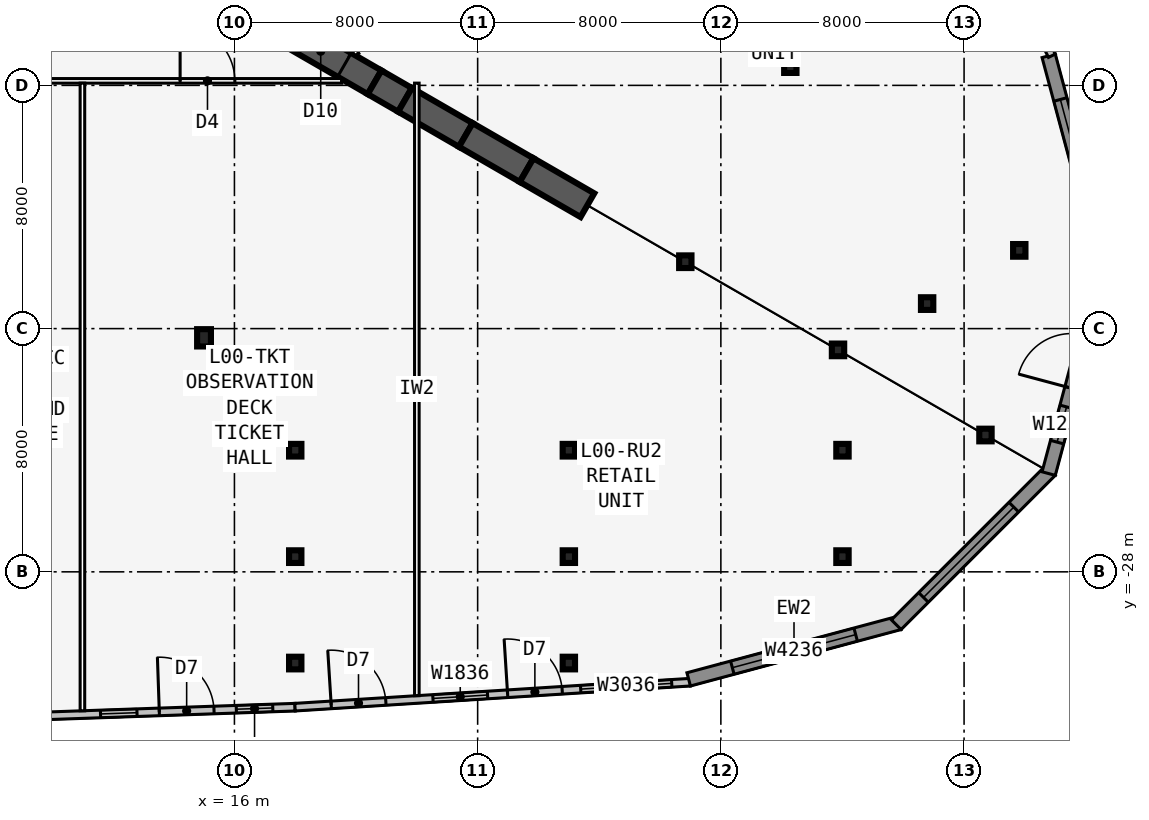
"""IFC4 building model, lengths in metres.
Left out: names, types, materials, properties, quantities, classifications, styles, units other than length and angle.
Written with IfcOpenShell. Run it as: python <this file> out.ifc"""

import sys

from ifc_helpers import new_model, si_unit, direction, frame, frame_2d, origin, origin_2d, place, context, subcontext, project, spatial, rectangle, i_section, extrude, element, fill, save


model = new_model("IFC4")
c1 = context("Model", 3, precision=1e-05, world=origin(), true_north=direction((0.0, 1.0)))
c2 = subcontext(c1, "Body", "Model", "MODEL_VIEW")
j1 = project(units=[si_unit("LENGTHUNIT", "METRE"), si_unit("PLANEANGLEUNIT", "RADIAN")], contexts=[c1])
p1 = place(None, origin())
s1 = spatial("IfcSite", under=j1, at=p1, CompositionType="ELEMENT")
p2 = place(p1, origin())
s2 = spatial("IfcBuilding", under=s1, at=p2, CompositionType="ELEMENT")
p3 = place(p2, origin())
s3 = spatial("IfcBuildingStorey", under=s2, at=p3, CompositionType="ELEMENT", Elevation=0.0)
p4 = place(p3, frame((16.5, -9.526, -0.3), z_axis=(0.0, 0.0, 1.0), x_axis=(0.866031398331, -0.499989616998, 0.0)))
e1 = element("IfcWall", 1, at=p4, inside=s3, PredefinedType="SHEAR", context=c2, shape_type="SweptSolid", body=[
    extrude(rectangle(XDim=4.746, YDim=0.9, at=frame_2d((2.373, 0.0))), origin(), (0.0, 0.0, 1.0), 6.3),
])
p5 = place(p4, frame((1.8, 0.0, 0.3)))
e2 = element("IfcOpeningElement", 2, at=p5, cuts=e1, PredefinedType="OPENING", context=c2, shape_type="SweptSolid", body=[
    extrude(rectangle(XDim=1.8, YDim=2.13, at=frame_2d((0.9, 1.065))), frame((0.0, 0.46, 0.0), z_axis=(0.0, -1.0, 0.0), x_axis=(1.0, 0.0, 0.0)), (0.0, 0.0, 1.0), 0.92),
])
p6 = place(p3, frame((20.61, -11.899, -0.3), z_axis=(0.0, 0.0, 1.0), x_axis=(0.866009537788, -0.500027479704, 0.0)))
e3 = element("IfcWall", 3, at=p6, inside=s3, PredefinedType="SHEAR", context=c2, shape_type="SweptSolid", body=[
    extrude(rectangle(XDim=1.155, YDim=0.9, at=frame_2d((0.577, 0.0))), origin(), (0.0, 0.0, 1.0), 6.3),
])
for number, where, z_axis, x_axis in (
    (4, (21.61, -12.477, -0.3), (0.0, 0.0, 1.0), (0.866, -0.5, 0.0)),
    (5, (23.61, -13.631, -0.3), (0.0, 0.0, 1.0), (0.866, -0.5, 0.0)),
    (6, (25.61, -14.786, -0.3), (0.0, 0.0, 1.0), (0.866, -0.5, 0.0)),
):
    element("IfcWall", number, at=place(p3, frame(where, z_axis=z_axis, x_axis=x_axis)), inside=s3, PredefinedType="SHEAR", context=c2, shape_type="SweptSolid", body=[
        extrude(rectangle(XDim=2.309, YDim=0.9, at=frame_2d((1.155, 0.0))), origin(), (0.0, 0.0, 1.0), 6.3),
    ])
p7 = place(p3, frame((15.0, -20.303, -0.3), z_axis=(0.0, 0.0, 1.0), x_axis=(1.0, 0.0, 0.0)))
e7 = element("IfcColumn", 7, at=p7, inside=s3, PredefinedType="COLUMN", context=c2, shape_type="SweptSolid", body=[
    extrude(i_section(OverallWidth=0.455, OverallDepth=0.569, WebThickness=0.078, FlangeThickness=0.125, at=origin_2d()), origin(), (0.0, 0.0, 1.0), 6.3),
])
for number, where, z_axis, x_axis in (
    (8, (30.831, -17.8, -0.3), (0.0, 0.0, 1.0), (1.0, 0.0, 0.0)),
    (9, (35.854, -20.7, -0.3), (0.0, 0.0, 1.0), (1.0, 0.0, 0.0)),
    (10, (40.703, -23.5, -0.3), (0.0, 0.0, 1.0), (1.0, 0.0, 0.0)),
    (11, (18.0, -24.0, -0.3), (0.0, 0.0, 1.0), (1.0, 0.0, 0.0)),
    (12, (27.0, -24.0, -0.3), (0.0, 0.0, 1.0), (1.0, 0.0, 0.0)),
    (13, (36.0, -24.0, -0.3), (0.0, 0.0, 1.0), (1.0, 0.0, 0.0)),
    (14, (34.285, -11.383, -0.3), (0.0, 0.0, 1.0), (1.0, 0.0, 0.0)),
    (15, (38.785, -19.177, -0.3), (0.0, 0.0, 1.0), (1.0, 0.0, 0.0)),
    (16, (18.0, -27.5, -0.3), (0.0, 0.0, 1.0), (1.0, 0.0, 0.0)),
    (17, (27.0, -27.5, -0.3), (0.0, 0.0, 1.0), (1.0, 0.0, 0.0)),
    (18, (36.0, -27.5, -0.3), (0.0, 0.0, 1.0), (1.0, 0.0, 0.0)),
    (19, (41.816, -17.427, -0.3), (0.0, 0.0, 1.0), (1.0, 0.0, 0.0)),
    (20, (18.0, -31.0, -0.3), (0.0, 0.0, 1.0), (1.0, 0.0, 0.0)),
    (21, (27.0, -31.0, -0.3), (0.0, 0.0, 1.0), (1.0, 0.0, 0.0)),
):
    element("IfcColumn", number, at=place(p3, frame(where, z_axis=z_axis, x_axis=x_axis)), inside=s3, PredefinedType="COLUMN", context=c2, shape_type="SweptSolid", body=[
        extrude(i_section(OverallWidth=0.406, OverallDepth=0.417, WebThickness=0.03, FlangeThickness=0.048, at=origin_2d()), origin(), (0.0, 0.0, 1.0), 6.3),
    ])
p8 = place(p3, frame((8.996, -32.765, -0.3), z_axis=(0.0, 0.0, 1.0), x_axis=(0.999393961522, 0.034809620405, 0.0)))
e22 = element("IfcWall", 22, at=p8, inside=s3, PredefinedType="STANDARD", context=c2, shape_type="SweptSolid", body=[
    extrude(rectangle(XDim=9.005, YDim=0.25, at=frame_2d((4.503, 0.0))), origin(), (0.0, 0.0, 1.0), 6.05),
])
p9 = place(p8, frame((4.536, 0.0, 0.3)))
e23 = element("IfcOpeningElement", 23, at=p9, cuts=e22, PredefinedType="OPENING", context=c2, shape_type="SweptSolid", body=[
    extrude(rectangle(XDim=1.8, YDim=2.7, at=frame_2d((0.9, 1.35))), frame((0.0, 0.135, 0.0), z_axis=(0.0, -1.0, 0.0), x_axis=(1.0, 0.0, 0.0)), (0.0, 0.0, 1.0), 0.27),
])
p10 = place(p8, frame((2.602, 0.0, 1.2)))
e24 = element("IfcOpeningElement", 24, at=p10, cuts=e22, PredefinedType="OPENING", context=c2, shape_type="SweptSolid", body=[
    extrude(rectangle(XDim=1.2, YDim=3.6, at=frame_2d((0.6, 1.8))), frame((0.0, 0.135, 0.0), z_axis=(0.0, -1.0, 0.0), x_axis=(1.0, 0.0, 0.0)), (0.0, 0.0, 1.0), 0.27),
])
p11 = place(p8, frame((7.071, 0.0, 1.2)))
e25 = element("IfcOpeningElement", 25, at=p11, cuts=e22, PredefinedType="OPENING", context=c2, shape_type="SweptSolid", body=[
    extrude(rectangle(XDim=1.2, YDim=3.6, at=frame_2d((0.6, 1.8))), frame((0.0, 0.135, 0.0), z_axis=(0.0, -1.0, 0.0), x_axis=(1.0, 0.0, 0.0)), (0.0, 0.0, 1.0), 0.27),
])
p12 = place(p3, frame((17.992, -32.451, -0.3), z_axis=(0.0, 0.0, 1.0), x_axis=(0.998006805525, 0.063106387361, 0.0)))
e26 = element("IfcWall", 26, at=p12, inside=s3, PredefinedType="STANDARD", context=c2, shape_type="SweptSolid", body=[
    extrude(rectangle(XDim=13.026, YDim=0.25, at=frame_2d((6.513, 0.0))), origin(), (0.0, 0.0, 1.0), 6.05),
])
p13 = place(p12, frame((1.193, 0.0, 0.3)))
e27 = element("IfcOpeningElement", 27, at=p13, cuts=e26, PredefinedType="OPENING", context=c2, shape_type="SweptSolid", body=[
    extrude(rectangle(XDim=1.8, YDim=2.7, at=frame_2d((0.9, 1.35))), frame((0.0, 0.135, 0.0), z_axis=(0.0, -1.0, 0.0), x_axis=(1.0, 0.0, 0.0)), (0.0, 0.0, 1.0), 0.27),
])
p14 = place(p12, frame((7.006, 0.0, 0.3)))
e28 = element("IfcOpeningElement", 28, at=p14, cuts=e26, PredefinedType="OPENING", context=c2, shape_type="SweptSolid", body=[
    extrude(rectangle(XDim=1.8, YDim=2.7, at=frame_2d((0.9, 1.35))), frame((0.0, 0.135, 0.0), z_axis=(0.0, -1.0, 0.0), x_axis=(1.0, 0.0, 0.0)), (0.0, 0.0, 1.0), 0.27),
])
p15 = place(p12, frame((4.546, 0.0, 1.2)))
e29 = element("IfcOpeningElement", 29, at=p15, cuts=e26, PredefinedType="OPENING", context=c2, shape_type="SweptSolid", body=[
    extrude(rectangle(XDim=1.8, YDim=3.6, at=frame_2d((0.9, 1.8))), frame((0.0, 0.135, 0.0), z_axis=(0.0, -1.0, 0.0), x_axis=(1.0, 0.0, 0.0)), (0.0, 0.0, 1.0), 0.27),
])
p16 = place(p12, frame((9.416, 0.0, 1.2)))
e30 = element("IfcOpeningElement", 30, at=p16, cuts=e26, PredefinedType="OPENING", context=c2, shape_type="SweptSolid", body=[
    extrude(rectangle(XDim=3.0, YDim=3.6, at=frame_2d((1.5, 1.8))), frame((0.0, 0.135, 0.0), z_axis=(0.0, -1.0, 0.0), x_axis=(1.0, 0.0, 0.0)), (0.0, 0.0, 1.0), 0.27),
])
p17 = place(p3, frame((30.942, -31.537, -0.3), z_axis=(0.0, 0.0, 1.0), x_axis=(0.965924653531, 0.258823421857, 0.0)))
e31 = element("IfcWall", 31, at=p17, inside=s3, PredefinedType="SOLIDWALL", context=c2, shape_type="SweptSolid", body=[
    extrude(rectangle(XDim=7.173, YDim=0.45, at=frame_2d((3.586, 0.0))), origin(), (0.0, 0.0, 1.0), 6.05),
])
p18 = place(p17, frame((1.486, 0.0, 1.2)))
e32 = element("IfcOpeningElement", 32, at=p18, cuts=e31, PredefinedType="OPENING", context=c2, shape_type="SweptSolid", body=[
    extrude(rectangle(XDim=4.2, YDim=3.6, at=frame_2d((2.1, 1.8))), frame((0.0, 0.235, 0.0), z_axis=(0.0, -1.0, 0.0), x_axis=(1.0, 0.0, 0.0)), (0.0, 0.0, 1.0), 0.47),
])
p19 = place(p3, frame((37.769, -29.739, -0.3), z_axis=(0.0, 0.0, 1.0), x_axis=(0.707106781187, 0.707106781187, 0.0)))
e33 = element("IfcWall", 33, at=p19, inside=s3, PredefinedType="SOLIDWALL", context=c2, shape_type="SweptSolid", body=[
    extrude(rectangle(XDim=7.173, YDim=0.45, at=frame_2d((3.586, 0.0))), origin(), (0.0, 0.0, 1.0), 6.05),
])
p20 = place(p19, frame((1.268, 0.0, 1.2)))
e34 = element("IfcOpeningElement", 34, at=p20, cuts=e33, PredefinedType="OPENING", context=c2, shape_type="SweptSolid", body=[
    extrude(rectangle(XDim=4.2, YDim=3.6, at=frame_2d((2.1, 1.8))), frame((0.0, 0.235, 0.0), z_axis=(0.0, -1.0, 0.0), x_axis=(1.0, 0.0, 0.0)), (0.0, 0.0, 1.0), 0.47),
])
p21 = place(p3, frame((42.783, -24.768, -0.3), z_axis=(0.0, 0.0, 1.0), x_axis=(0.258823421857, 0.965924653531, 0.0)))
e35 = element("IfcWall", 35, at=p21, inside=s3, PredefinedType="SOLIDWALL", context=c2, shape_type="SweptSolid", body=[
    extrude(rectangle(XDim=7.173, YDim=0.45, at=frame_2d((3.586, 0.0))), origin(), (0.0, 0.0, 1.0), 6.05),
])
p22 = place(p21, frame((2.905, 0.0, 0.3)))
e36 = element("IfcOpeningElement", 36, at=p22, cuts=e35, PredefinedType="OPENING", context=c2, shape_type="SweptSolid", body=[
    extrude(rectangle(XDim=1.8, YDim=2.7, at=frame_2d((0.9, 1.35))), frame((0.0, 0.235, 0.0), z_axis=(0.0, -1.0, 0.0), x_axis=(1.0, 0.0, 0.0)), (0.0, 0.0, 1.0), 0.47),
])
p23 = place(p21, frame((1.071, 0.0, 1.2)))
e37 = element("IfcOpeningElement", 37, at=p23, cuts=e35, PredefinedType="OPENING", context=c2, shape_type="SweptSolid", body=[
    extrude(rectangle(XDim=1.2, YDim=3.6, at=frame_2d((0.6, 1.8))), frame((0.0, 0.235, 0.0), z_axis=(0.0, -1.0, 0.0), x_axis=(1.0, 0.0, 0.0)), (0.0, 0.0, 1.0), 0.47),
])
p24 = place(p21, frame((5.339, 0.0, 1.2)))
e38 = element("IfcOpeningElement", 38, at=p24, cuts=e35, PredefinedType="OPENING", context=c2, shape_type="SweptSolid", body=[
    extrude(rectangle(XDim=1.2, YDim=3.6, at=frame_2d((0.6, 1.8))), frame((0.0, 0.235, 0.0), z_axis=(0.0, -1.0, 0.0), x_axis=(1.0, 0.0, 0.0)), (0.0, 0.0, 1.0), 0.47),
])
p25 = place(p3, frame((44.639, -17.956, -0.3), z_axis=(0.0, 0.0, 1.0), x_axis=(-0.258823421857, 0.965924653531, 0.0)))
e39 = element("IfcWall", 39, at=p25, inside=s3, PredefinedType="SOLIDWALL", context=c2, shape_type="SweptSolid", body=[
    extrude(rectangle(XDim=7.173, YDim=0.45, at=frame_2d((3.586, 0.0))), origin(), (0.0, 0.0, 1.0), 6.05),
])
p26 = place(p25, frame((1.486, 0.0, 1.2)))
e40 = element("IfcOpeningElement", 40, at=p26, cuts=e39, PredefinedType="OPENING", context=c2, shape_type="SweptSolid", body=[
    extrude(rectangle(XDim=4.2, YDim=3.6, at=frame_2d((2.1, 1.8))), frame((0.0, 0.235, 0.0), z_axis=(0.0, -1.0, 0.0), x_axis=(1.0, 0.0, 0.0)), (0.0, 0.0, 1.0), 0.47),
])
p27 = place(p3, frame((42.888, -11.025, -0.3), z_axis=(0.0, 0.0, 1.0), x_axis=(-0.444354908353, 0.895850833243, 0.0)))
e41 = element("IfcWall", 41, at=p27, inside=s3, PredefinedType="STANDARD", context=c2, shape_type="SweptSolid", body=[
    extrude(rectangle(XDim=13.026, YDim=0.25, at=frame_2d((6.513, 0.0))), origin(), (0.0, 0.0, 1.0), 6.05),
])
p28 = place(p27, frame((4.413, 0.0, 1.2)))
e42 = element("IfcOpeningElement", 42, at=p28, cuts=e41, PredefinedType="OPENING", context=c2, shape_type="SweptSolid", body=[
    extrude(rectangle(XDim=4.2, YDim=3.6, at=frame_2d((2.1, 1.8))), frame((0.0, 0.135, 0.0), z_axis=(0.0, -1.0, 0.0), x_axis=(1.0, 0.0, 0.0)), (0.0, 0.0, 1.0), 0.27),
])
p29 = place(p3, frame((-19.527, -11.851, -0.3), z_axis=(0.0, 0.0, 1.0), x_axis=(1.0, 0.0, 0.0)))
e43 = element("IfcWall", 43, at=p29, inside=s3, PredefinedType="PARTITIONING", context=c2, shape_type="SweptSolid", body=[
    extrude(rectangle(XDim=39.054, YDim=0.15, at=frame_2d((19.527, 0.0))), origin(), (0.0, 0.0, 1.0), 5.108),
])
p30 = place(p29, frame((8.427, 0.0, 0.3)))
e44 = element("IfcOpeningElement", 44, at=p30, cuts=e43, PredefinedType="OPENING", context=c2, shape_type="SweptSolid", body=[
    extrude(rectangle(XDim=1.8, YDim=2.13, at=frame_2d((0.9, 1.065))), frame((0.0, 0.085, 0.0), z_axis=(0.0, -1.0, 0.0), x_axis=(1.0, 0.0, 0.0)), (0.0, 0.0, 1.0), 0.17),
])
p31 = place(p29, frame((18.427, 0.0, 0.3)))
e45 = element("IfcOpeningElement", 45, at=p31, cuts=e43, PredefinedType="OPENING", context=c2, shape_type="SweptSolid", body=[
    extrude(rectangle(XDim=1.8, YDim=2.13, at=frame_2d((0.9, 1.065))), frame((0.0, 0.085, 0.0), z_axis=(0.0, -1.0, 0.0), x_axis=(1.0, 0.0, 0.0)), (0.0, 0.0, 1.0), 0.17),
])
p32 = place(p29, frame((23.227, 0.0, 0.3)))
e46 = element("IfcOpeningElement", 46, at=p32, cuts=e43, PredefinedType="OPENING", context=c2, shape_type="SweptSolid", body=[
    extrude(rectangle(XDim=1.8, YDim=2.13, at=frame_2d((0.9, 1.065))), frame((0.0, 0.085, 0.0), z_axis=(0.0, -1.0, 0.0), x_axis=(1.0, 0.0, 0.0)), (0.0, 0.0, 1.0), 0.17),
])
p33 = place(p29, frame((28.127, 0.0, 0.3)))
e47 = element("IfcOpeningElement", 47, at=p33, cuts=e43, PredefinedType="OPENING", context=c2, shape_type="SweptSolid", body=[
    extrude(rectangle(XDim=1.0, YDim=2.13, at=frame_2d((0.5, 1.065))), frame((0.0, 0.085, 0.0), z_axis=(0.0, -1.0, 0.0), x_axis=(1.0, 0.0, 0.0)), (0.0, 0.0, 1.0), 0.17),
])
p34 = place(p29, frame((33.74, 0.0, 0.3)))
e48 = element("IfcOpeningElement", 48, at=p34, cuts=e43, PredefinedType="OPENING", context=c2, shape_type="SweptSolid", body=[
    extrude(rectangle(XDim=1.8, YDim=2.13, at=frame_2d((0.9, 1.065))), frame((0.0, 0.085, 0.0), z_axis=(0.0, -1.0, 0.0), x_axis=(1.0, 0.0, 0.0)), (0.0, 0.0, 1.0), 0.17),
])
p35 = place(p3, frame((11.0, -11.926, -0.3), z_axis=(0.0, 0.0, 1.0), x_axis=(0.0, -1.0, 0.0)))
e49 = element("IfcWall", 49, at=p35, inside=s3, PredefinedType="PARTITIONING", context=c2, shape_type="SweptSolid", body=[
    extrude(rectangle(XDim=20.644, YDim=0.15, at=frame_2d((10.322, 0.0))), origin(), (0.0, 0.0, 1.0), 6.05),
])
p36 = place(p3, frame((22.0, -11.926, -0.3), z_axis=(0.0, 0.0, 1.0), x_axis=(0.0, -1.0, 0.0)))
e50 = element("IfcWall", 50, at=p36, inside=s3, PredefinedType="PARTITIONING", context=c2, shape_type="SweptSolid", body=[
    extrude(rectangle(XDim=20.146, YDim=0.15, at=frame_2d((10.073, 0.0))), origin(), (0.0, 0.0, 1.0), 6.05),
])
p37 = place(p3, frame((20.027, -10.985, -0.3), z_axis=(0.0, 0.0, 1.0), x_axis=(-0.500001677587, 0.866024435227, 0.0)))
e51 = element("IfcWall", 51, at=p37, inside=s3, PredefinedType="PARTITIONING", context=c2, shape_type="SweptSolid", body=[
    extrude(rectangle(XDim=39.054, YDim=0.15, at=frame_2d((19.527, 0.0))), origin(), (0.0, 0.0, 1.0), 5.108),
])
p38 = place(p37, frame((8.427, 0.0, 0.3)))
e52 = element("IfcOpeningElement", 52, at=p38, cuts=e51, PredefinedType="OPENING", context=c2, shape_type="SweptSolid", body=[
    extrude(rectangle(XDim=1.8, YDim=2.13, at=frame_2d((0.9, 1.065))), frame((0.0, 0.085, 0.0), z_axis=(0.0, -1.0, 0.0), x_axis=(1.0, 0.0, 0.0)), (0.0, 0.0, 1.0), 0.17),
])
p39 = place(p37, frame((18.427, 0.0, 0.3)))
e53 = element("IfcOpeningElement", 53, at=p39, cuts=e51, PredefinedType="OPENING", context=c2, shape_type="SweptSolid", body=[
    extrude(rectangle(XDim=1.8, YDim=2.13, at=frame_2d((0.9, 1.065))), frame((0.0, 0.085, 0.0), z_axis=(0.0, -1.0, 0.0), x_axis=(1.0, 0.0, 0.0)), (0.0, 0.0, 1.0), 0.17),
])
p40 = place(p37, frame((23.227, 0.0, 0.3)))
e54 = element("IfcOpeningElement", 54, at=p40, cuts=e51, PredefinedType="OPENING", context=c2, shape_type="SweptSolid", body=[
    extrude(rectangle(XDim=1.8, YDim=2.13, at=frame_2d((0.9, 1.065))), frame((0.0, 0.085, 0.0), z_axis=(0.0, -1.0, 0.0), x_axis=(1.0, 0.0, 0.0)), (0.0, 0.0, 1.0), 0.17),
])
p41 = place(p37, frame((27.627, 0.0, 0.3)))
e55 = element("IfcOpeningElement", 55, at=p41, cuts=e51, PredefinedType="OPENING", context=c2, shape_type="SweptSolid", body=[
    extrude(rectangle(XDim=1.0, YDim=2.13, at=frame_2d((0.5, 1.065))), frame((0.0, 0.085, 0.0), z_axis=(0.0, -1.0, 0.0), x_axis=(1.0, 0.0, 0.0)), (0.0, 0.0, 1.0), 0.17),
])
p42 = place(p37, frame((30.527, 0.0, 0.3)))
e56 = element("IfcOpeningElement", 56, at=p42, cuts=e51, PredefinedType="OPENING", context=c2, shape_type="SweptSolid", body=[
    extrude(rectangle(XDim=1.0, YDim=2.13, at=frame_2d((0.5, 1.065))), frame((0.0, 0.085, 0.0), z_axis=(0.0, -1.0, 0.0), x_axis=(1.0, 0.0, 0.0)), (0.0, 0.0, 1.0), 0.17),
])
p43 = place(p37, frame((33.277, 0.0, 0.3)))
e57 = element("IfcOpeningElement", 57, at=p43, cuts=e51, PredefinedType="OPENING", context=c2, shape_type="SweptSolid", body=[
    extrude(rectangle(XDim=1.0, YDim=2.13, at=frame_2d((0.5, 1.065))), frame((0.0, 0.085, 0.0), z_axis=(0.0, -1.0, 0.0), x_axis=(1.0, 0.0, 0.0)), (0.0, 0.0, 1.0), 0.17),
])
p44 = place(p37, frame((36.39, 0.0, 0.3)))
e58 = element("IfcOpeningElement", 58, at=p44, cuts=e51, PredefinedType="OPENING", context=c2, shape_type="SweptSolid", body=[
    extrude(rectangle(XDim=1.0, YDim=2.13, at=frame_2d((0.5, 1.065))), frame((0.0, 0.085, 0.0), z_axis=(0.0, -1.0, 0.0), x_axis=(1.0, 0.0, 0.0)), (0.0, 0.0, 1.0), 0.17),
])
p45 = place(p9, origin())
e59 = element("IfcDoor", 59, at=p45, inside=s3, OperationType="DOUBLE_DOOR_SINGLE_SWING", PredefinedType="DOOR", context=c2, shape_type="SweptSolid", body=[
    extrude(rectangle(XDim=1.8, YDim=2.7, at=frame_2d((0.9, 1.35))), frame((0.0, 0.025, 0.0), z_axis=(0.0, -1.0, 0.0), x_axis=(1.0, 0.0, 0.0)), (0.0, 0.0, 1.0), 0.05),
])
fill(e23, e59)
p46 = place(p10, origin())
e60 = element("IfcWindow", 60, at=p46, inside=s3, PartitioningType="SINGLE_PANEL", PredefinedType="WINDOW", context=c2, shape_type="SweptSolid", body=[
    extrude(rectangle(XDim=1.2, YDim=3.6, at=frame_2d((0.6, 1.8))), frame((0.0, 0.03, 0.0), z_axis=(0.0, -1.0, 0.0), x_axis=(1.0, 0.0, 0.0)), (0.0, 0.0, 1.0), 0.06),
])
fill(e24, e60)
p47 = place(p11, origin())
e61 = element("IfcWindow", 61, at=p47, inside=s3, PartitioningType="SINGLE_PANEL", PredefinedType="WINDOW", context=c2, shape_type="SweptSolid", body=[
    extrude(rectangle(XDim=1.2, YDim=3.6, at=frame_2d((0.6, 1.8))), frame((0.0, 0.03, 0.0), z_axis=(0.0, -1.0, 0.0), x_axis=(1.0, 0.0, 0.0)), (0.0, 0.0, 1.0), 0.06),
])
fill(e25, e61)
p48 = place(p13, origin())
e62 = element("IfcDoor", 62, at=p48, inside=s3, OperationType="DOUBLE_DOOR_SINGLE_SWING", PredefinedType="DOOR", context=c2, shape_type="SweptSolid", body=[
    extrude(rectangle(XDim=1.8, YDim=2.7, at=frame_2d((0.9, 1.35))), frame((0.0, 0.025, 0.0), z_axis=(0.0, -1.0, 0.0), x_axis=(1.0, 0.0, 0.0)), (0.0, 0.0, 1.0), 0.05),
])
fill(e27, e62)
p49 = place(p14, origin())
e63 = element("IfcDoor", 63, at=p49, inside=s3, OperationType="DOUBLE_DOOR_SINGLE_SWING", PredefinedType="DOOR", context=c2, shape_type="SweptSolid", body=[
    extrude(rectangle(XDim=1.8, YDim=2.7, at=frame_2d((0.9, 1.35))), frame((0.0, 0.025, 0.0), z_axis=(0.0, -1.0, 0.0), x_axis=(1.0, 0.0, 0.0)), (0.0, 0.0, 1.0), 0.05),
])
fill(e28, e63)
p50 = place(p15, origin())
e64 = element("IfcWindow", 64, at=p50, inside=s3, PartitioningType="SINGLE_PANEL", PredefinedType="WINDOW", context=c2, shape_type="SweptSolid", body=[
    extrude(rectangle(XDim=1.8, YDim=3.6, at=frame_2d((0.9, 1.8))), frame((0.0, 0.03, 0.0), z_axis=(0.0, -1.0, 0.0), x_axis=(1.0, 0.0, 0.0)), (0.0, 0.0, 1.0), 0.06),
])
fill(e29, e64)
p51 = place(p16, origin())
e65 = element("IfcWindow", 65, at=p51, inside=s3, PartitioningType="SINGLE_PANEL", PredefinedType="WINDOW", context=c2, shape_type="SweptSolid", body=[
    extrude(rectangle(XDim=3.0, YDim=3.6, at=frame_2d((1.5, 1.8))), frame((0.0, 0.03, 0.0), z_axis=(0.0, -1.0, 0.0), x_axis=(1.0, 0.0, 0.0)), (0.0, 0.0, 1.0), 0.06),
])
fill(e30, e65)
p52 = place(p18, origin())
e66 = element("IfcWindow", 66, at=p52, inside=s3, PartitioningType="SINGLE_PANEL", PredefinedType="WINDOW", context=c2, shape_type="SweptSolid", body=[
    extrude(rectangle(XDim=4.2, YDim=3.6, at=frame_2d((2.1, 1.8))), frame((0.0, 0.03, 0.0), z_axis=(0.0, -1.0, 0.0), x_axis=(1.0, 0.0, 0.0)), (0.0, 0.0, 1.0), 0.06),
])
fill(e32, e66)
p53 = place(p20, origin())
e67 = element("IfcWindow", 67, at=p53, inside=s3, PartitioningType="SINGLE_PANEL", PredefinedType="WINDOW", context=c2, shape_type="SweptSolid", body=[
    extrude(rectangle(XDim=4.2, YDim=3.6, at=frame_2d((2.1, 1.8))), frame((0.0, 0.03, 0.0), z_axis=(0.0, -1.0, 0.0), x_axis=(1.0, 0.0, 0.0)), (0.0, 0.0, 1.0), 0.06),
])
fill(e34, e67)
p54 = place(p23, origin())
e68 = element("IfcWindow", 68, at=p54, inside=s3, PartitioningType="SINGLE_PANEL", PredefinedType="WINDOW", context=c2, shape_type="SweptSolid", body=[
    extrude(rectangle(XDim=1.2, YDim=3.6, at=frame_2d((0.6, 1.8))), frame((0.0, 0.03, 0.0), z_axis=(0.0, -1.0, 0.0), x_axis=(1.0, 0.0, 0.0)), (0.0, 0.0, 1.0), 0.06),
])
fill(e37, e68)
p55 = place(p26, origin())
e69 = element("IfcWindow", 69, at=p55, inside=s3, PartitioningType="SINGLE_PANEL", PredefinedType="WINDOW", context=c2, shape_type="SweptSolid", body=[
    extrude(rectangle(XDim=4.2, YDim=3.6, at=frame_2d((2.1, 1.8))), frame((0.0, 0.03, 0.0), z_axis=(0.0, -1.0, 0.0), x_axis=(1.0, 0.0, 0.0)), (0.0, 0.0, 1.0), 0.06),
])
fill(e40, e69)
p56 = place(p34, origin())
e70 = element("IfcDoor", 70, at=p56, inside=s3, OperationType="DOUBLE_DOOR_SINGLE_SWING", PredefinedType="DOOR", context=c2, shape_type="SweptSolid", body=[
    extrude(rectangle(XDim=1.8, YDim=2.13, at=frame_2d((0.9, 1.065))), frame((0.0, 0.025, 0.0), z_axis=(0.0, -1.0, 0.0), x_axis=(1.0, 0.0, 0.0)), (0.0, 0.0, 1.0), 0.05),
])
fill(e48, e70)
p57 = place(p5, origin())
e71 = element("IfcDoor", 71, at=p57, inside=s3, OperationType="DOUBLE_DOOR_DOUBLE_SWING", PredefinedType="DOOR", context=c2, shape_type="SweptSolid", body=[
    extrude(rectangle(XDim=1.8, YDim=2.13, at=frame_2d((0.9, 1.065))), frame((0.0, 0.025, 0.0), z_axis=(0.0, -1.0, 0.0), x_axis=(1.0, 0.0, 0.0)), (0.0, 0.0, 1.0), 0.05),
])
fill(e2, e71)
save(model, sys.argv[1])
